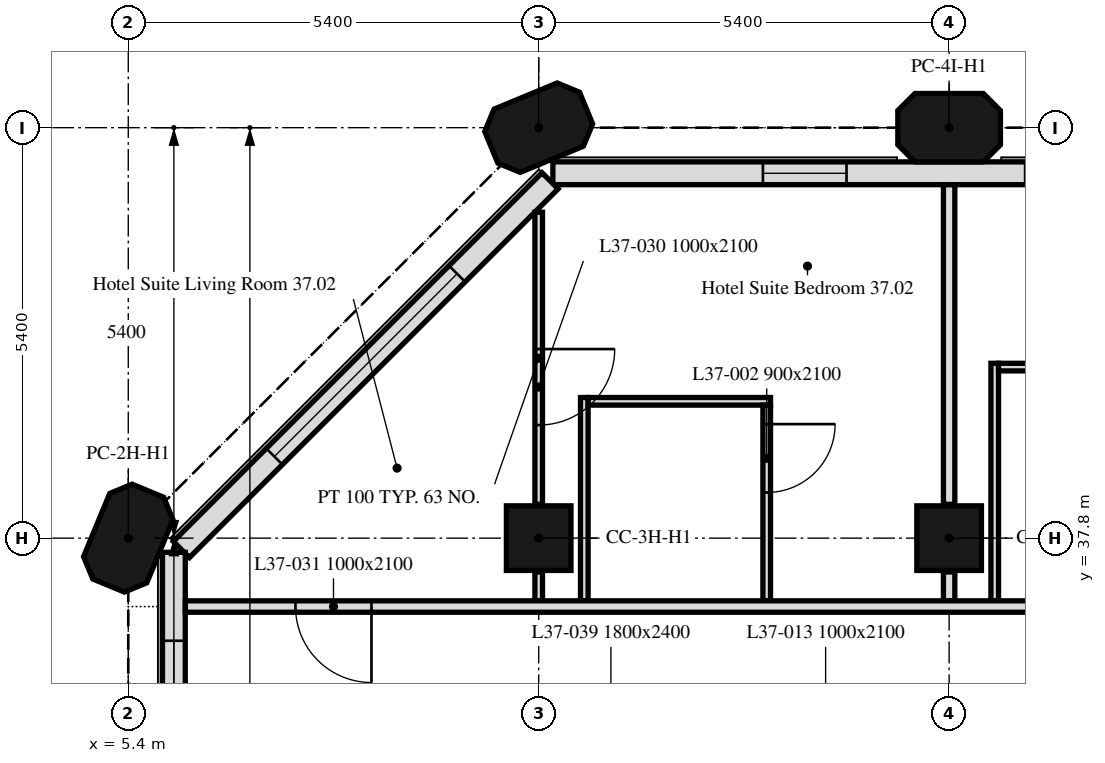
"""IFC4 building model, lengths in metres.
Left out: names, types, materials, properties, quantities, classifications, styles, units other than length and angle.
Written with IfcOpenShell. Run it as: python <this file> out.ifc"""

import sys

from ifc_helpers import new_model, si_unit, direction, frame, frame_2d, origin, origin_2d, place, context, subcontext, project, spatial, polyline, rectangle, outline, extrude, element, fill, save


model = new_model("IFC4")
c1 = context("Model", 3, precision=1e-05, world=origin(), true_north=direction((0.0, 1.0)))
c2 = subcontext(c1, "Body", "Model", "MODEL_VIEW")
j1 = project(units=[si_unit("LENGTHUNIT", "METRE"), si_unit("PLANEANGLEUNIT", "RADIAN")], contexts=[c1])
p1 = place(None, origin())
s1 = spatial("IfcSite", under=j1, at=p1, CompositionType="ELEMENT")
p2 = place(p1, origin())
s2 = spatial("IfcBuilding", under=s1, at=p2, CompositionType="ELEMENT")
p3 = place(p2, frame((0.0, 0.0, 159.4)))
s3 = spatial("IfcBuildingStorey", under=s2, at=p3, CompositionType="ELEMENT", Elevation=159.4)
p4 = place(p3, frame((5.4, 37.8, 0.0), z_axis=(0.0, 0.0, 1.0), x_axis=(0.382683432365, 0.923879532511, 0.0)))
e1 = element("IfcColumn", 1, at=p4, inside=s3, PredefinedType="COLUMN", context=c2, shape_type="SweptSolid", body=[
    extrude(outline(polyline([(-0.45, -0.45), (0.45, -0.45), (0.675, -0.225), (0.675, 0.225), (0.45, 0.45), (-0.45, 0.45), (-0.675, 0.225), (-0.675, -0.225), (-0.45, -0.45)])), origin(), (0.0, 0.0, 1.0), 3.0),
])
for number, where, z_axis, x_axis in (
    (2, (10.8, 37.8, 0.0), (0.0, 0.0, 1.0), (1.0, 0.0, 0.0)),
    (3, (16.2, 37.8, 0.0), (0.0, 0.0, 1.0), (1.0, 0.0, 0.0)),
):
    element("IfcColumn", number, at=place(p3, frame(where, z_axis=z_axis, x_axis=x_axis)), inside=s3, PredefinedType="COLUMN", context=c2, shape_type="SweptSolid", body=[
        extrude(rectangle(XDim=0.85, YDim=0.85, at=origin_2d()), origin(), (0.0, 0.0, 1.0), 3.0),
    ])
for number, where, z_axis, x_axis in (
    (4, (10.8, 43.2, 0.0), (0.0, 0.0, 1.0), (0.924, 0.383, 0.0)),
    (5, (16.2, 43.2, 0.0), (0.0, 0.0, 1.0), (1.0, 0.0, 0.0)),
):
    element("IfcColumn", number, at=place(p3, frame(where, z_axis=z_axis, x_axis=x_axis)), inside=s3, PredefinedType="COLUMN", context=c2, shape_type="SweptSolid", body=[
        extrude(outline(polyline([(-0.45, -0.45), (0.45, -0.45), (0.675, -0.225), (0.675, 0.225), (0.45, 0.45), (-0.45, 0.45), (-0.675, 0.225), (-0.675, -0.225), (-0.45, -0.45)])), origin(), (0.0, 0.0, 1.0), 3.0),
    ])
p5 = place(p3, frame((43.014, 42.6, 0.0), z_axis=(0.0, 0.0, 1.0), x_axis=(-1.0, 0.0, 0.0)))
e6 = element("IfcWall", 6, at=p5, inside=s3, PredefinedType="SOLIDWALL", context=c2, shape_type="SweptSolid", body=[
    extrude(rectangle(XDim=32.027, YDim=0.3, at=frame_2d((16.014, 0.0))), origin(), (0.0, 0.0, 1.0), 3.0),
])
p6 = place(p5, frame((0.814, 0.0, 0.9)))
e7 = element("IfcOpeningElement", 7, at=p6, cuts=e6, PredefinedType="OPENING", context=c2, shape_type="SweptSolid", body=[
    extrude(rectangle(XDim=3.4, YDim=1.7, at=frame_2d((1.7, 0.85))), frame((0.0, 0.16, 0.0), z_axis=(0.0, -1.0, 0.0), x_axis=(1.0, 0.0, 0.0)), (0.0, 0.0, 1.0), 0.32),
])
p7 = place(p5, frame((6.564, 0.0, 0.9)))
e8 = element("IfcOpeningElement", 8, at=p7, cuts=e6, PredefinedType="OPENING", context=c2, shape_type="SweptSolid", body=[
    extrude(rectangle(XDim=1.1, YDim=1.7, at=frame_2d((0.55, 0.85))), frame((0.0, 0.16, 0.0), z_axis=(0.0, -1.0, 0.0), x_axis=(1.0, 0.0, 0.0)), (0.0, 0.0, 1.0), 0.32),
])
p8 = place(p5, frame((11.614, 0.0, 0.9)))
e9 = element("IfcOpeningElement", 9, at=p8, cuts=e6, PredefinedType="OPENING", context=c2, shape_type="SweptSolid", body=[
    extrude(rectangle(XDim=3.4, YDim=1.7, at=frame_2d((1.7, 0.85))), frame((0.0, 0.16, 0.0), z_axis=(0.0, -1.0, 0.0), x_axis=(1.0, 0.0, 0.0)), (0.0, 0.0, 1.0), 0.32),
])
p9 = place(p5, frame((17.364, 0.0, 0.9)))
e10 = element("IfcOpeningElement", 10, at=p9, cuts=e6, PredefinedType="OPENING", context=c2, shape_type="SweptSolid", body=[
    extrude(rectangle(XDim=1.1, YDim=1.7, at=frame_2d((0.55, 0.85))), frame((0.0, 0.16, 0.0), z_axis=(0.0, -1.0, 0.0), x_axis=(1.0, 0.0, 0.0)), (0.0, 0.0, 1.0), 0.32),
])
p10 = place(p5, frame((22.414, 0.0, 0.9)))
e11 = element("IfcOpeningElement", 11, at=p10, cuts=e6, PredefinedType="OPENING", context=c2, shape_type="SweptSolid", body=[
    extrude(rectangle(XDim=3.4, YDim=1.7, at=frame_2d((1.7, 0.85))), frame((0.0, 0.16, 0.0), z_axis=(0.0, -1.0, 0.0), x_axis=(1.0, 0.0, 0.0)), (0.0, 0.0, 1.0), 0.32),
])
p11 = place(p5, frame((28.164, 0.0, 0.9)))
e12 = element("IfcOpeningElement", 12, at=p11, cuts=e6, PredefinedType="OPENING", context=c2, shape_type="SweptSolid", body=[
    extrude(rectangle(XDim=1.1, YDim=1.7, at=frame_2d((0.55, 0.85))), frame((0.0, 0.16, 0.0), z_axis=(0.0, -1.0, 0.0), x_axis=(1.0, 0.0, 0.0)), (0.0, 0.0, 1.0), 0.32),
])
p12 = place(p3, frame((10.949, 42.501, 0.0), z_axis=(0.0, 0.0, 1.0), x_axis=(-0.707106781187, -0.707106781187, 0.0)))
e13 = element("IfcWall", 13, at=p12, inside=s3, PredefinedType="SOLIDWALL", context=c2, shape_type="SweptSolid", body=[
    extrude(rectangle(XDim=6.86, YDim=0.3, at=frame_2d((3.43, 0.0))), origin(), (0.0, 0.0, 1.0), 3.0),
])
p13 = place(p12, frame((1.73, 0.0, 0.9)))
e14 = element("IfcOpeningElement", 14, at=p13, cuts=e13, PredefinedType="OPENING", context=c2, shape_type="SweptSolid", body=[
    extrude(rectangle(XDim=3.4, YDim=1.7, at=frame_2d((1.7, 0.85))), frame((0.0, 0.16, 0.0), z_axis=(0.0, -1.0, 0.0), x_axis=(1.0, 0.0, 0.0)), (0.0, 0.0, 1.0), 0.32),
])
p14 = place(p3, frame((6.0, 37.614, 0.0), z_axis=(0.0, 0.0, 1.0), x_axis=(0.0, -1.0, 0.0)))
e15 = element("IfcWall", 15, at=p14, inside=s3, PredefinedType="SOLIDWALL", context=c2, shape_type="SweptSolid", body=[
    extrude(rectangle(XDim=5.214, YDim=0.3, at=frame_2d((2.607, 0.0))), origin(), (0.0, 0.0, 1.0), 3.0),
])
p15 = place(p14, frame((1.164, 0.0, 0.9)))
e16 = element("IfcOpeningElement", 16, at=p15, cuts=e15, PredefinedType="OPENING", context=c2, shape_type="SweptSolid", body=[
    extrude(rectangle(XDim=1.1, YDim=1.7, at=frame_2d((0.55, 0.85))), frame((0.0, 0.16, 0.0), z_axis=(0.0, -1.0, 0.0), x_axis=(1.0, 0.0, 0.0)), (0.0, 0.0, 1.0), 0.32),
])
p16 = place(p14, frame((2.764, 0.0, 0.9)))
e17 = element("IfcOpeningElement", 17, at=p16, cuts=e15, PredefinedType="OPENING", context=c2, shape_type="SweptSolid", body=[
    extrude(rectangle(XDim=1.1, YDim=1.7, at=frame_2d((0.55, 0.85))), frame((0.0, 0.16, 0.0), z_axis=(0.0, -1.0, 0.0), x_axis=(1.0, 0.0, 0.0)), (0.0, 0.0, 1.0), 0.32),
])
p17 = place(p3, frame((10.8, 42.088, 0.0), z_axis=(0.0, 0.0, 1.0), x_axis=(0.0, -1.0, 0.0)))
e18 = element("IfcWall", 18, at=p17, inside=s3, PredefinedType="PARTITIONING", context=c2, shape_type="SweptSolid", body=[
    extrude(rectangle(XDim=3.843, YDim=0.1, at=frame_2d((1.921, 0.0))), origin(), (0.0, 0.0, 1.0), 3.0),
])
p18 = place(p17, frame((1.8, 0.0, 0.0)))
e19 = element("IfcOpeningElement", 19, at=p18, cuts=e18, PredefinedType="OPENING", context=c2, shape_type="SweptSolid", body=[
    extrude(rectangle(XDim=1.0, YDim=2.1, at=frame_2d((0.5, 1.05))), frame((0.0, 0.05, 0.0), z_axis=(0.0, -1.0, 0.0), x_axis=(1.0, 0.0, 0.0)), (0.0, 0.0, 1.0), 0.1),
])
p19 = place(p3, frame((10.8, 37.355, 0.0), z_axis=(0.0, 0.0, 1.0), x_axis=(0.0, -1.0, 0.0)))
e20 = element("IfcWall", 20, at=p19, inside=s3, PredefinedType="PARTITIONING", context=c2, shape_type="SweptSolid", body=[
    extrude(rectangle(XDim=0.38, YDim=0.1, at=frame_2d((0.19, 0.0))), origin(), (0.0, 0.0, 1.0), 3.0),
])
p20 = place(p3, frame((11.4, 36.975, 0.0), z_axis=(0.0, 0.0, 1.0), x_axis=(0.0, 1.0, 0.0)))
e21 = element("IfcWall", 21, at=p20, inside=s3, PredefinedType="PARTITIONING", context=c2, shape_type="SweptSolid", body=[
    extrude(rectangle(XDim=2.675, YDim=0.1, at=frame_2d((1.337, 0.0))), origin(), (0.0, 0.0, 1.0), 3.0),
])
p21 = place(p3, frame((11.45, 39.6, 0.0), z_axis=(0.0, 0.0, 1.0), x_axis=(1.0, 0.0, 0.0)))
e22 = element("IfcWall", 22, at=p21, inside=s3, PredefinedType="PARTITIONING", context=c2, shape_type="SweptSolid", body=[
    extrude(rectangle(XDim=2.4, YDim=0.1, at=frame_2d((1.2, 0.0))), origin(), (0.0, 0.0, 1.0), 3.0),
])
p22 = place(p3, frame((13.8, 39.55, 0.0), z_axis=(0.0, 0.0, 1.0), x_axis=(0.0, -1.0, 0.0)))
e23 = element("IfcWall", 23, at=p22, inside=s3, PredefinedType="PARTITIONING", context=c2, shape_type="SweptSolid", body=[
    extrude(rectangle(XDim=2.575, YDim=0.1, at=frame_2d((1.288, 0.0))), origin(), (0.0, 0.0, 1.0), 3.0),
])
p23 = place(p22, frame((0.25, 0.0, 0.0)))
e24 = element("IfcOpeningElement", 24, at=p23, cuts=e23, PredefinedType="OPENING", context=c2, shape_type="SweptSolid", body=[
    extrude(rectangle(XDim=0.9, YDim=2.1, at=frame_2d((0.45, 1.05))), frame((0.0, 0.05, 0.0), z_axis=(0.0, -1.0, 0.0), x_axis=(1.0, 0.0, 0.0)), (0.0, 0.0, 1.0), 0.1),
])
p24 = place(p3, frame((16.2, 36.975, 0.0), z_axis=(0.0, 0.0, 1.0), x_axis=(0.0, 1.0, 0.0)))
e25 = element("IfcWall", 25, at=p24, inside=s3, PredefinedType="PARTITIONING", context=c2, shape_type="SweptSolid", body=[
    extrude(rectangle(XDim=0.38, YDim=0.15, at=frame_2d((0.19, 0.0))), origin(), (0.0, 0.0, 1.0), 3.0),
])
p25 = place(p3, frame((16.2, 38.245, 0.0), z_axis=(0.0, 0.0, 1.0), x_axis=(0.0, 1.0, 0.0)))
e26 = element("IfcWall", 26, at=p25, inside=s3, PredefinedType="PARTITIONING", context=c2, shape_type="SweptSolid", body=[
    extrude(rectangle(XDim=4.204, YDim=0.15, at=frame_2d((2.102, 0.0))), origin(), (0.0, 0.0, 1.0), 3.0),
])
p26 = place(p3, frame((16.8, 36.975, 0.0), z_axis=(0.0, 0.0, 1.0), x_axis=(0.0, 1.0, 0.0)))
e27 = element("IfcWall", 27, at=p26, inside=s3, PredefinedType="PARTITIONING", context=c2, shape_type="SweptSolid", body=[
    extrude(rectangle(XDim=3.125, YDim=0.1, at=frame_2d((1.562, 0.0))), origin(), (0.0, 0.0, 1.0), 3.0),
])
p27 = place(p3, frame((16.85, 40.05, 0.0), z_axis=(0.0, 0.0, 1.0), x_axis=(1.0, 0.0, 0.0)))
e28 = element("IfcWall", 28, at=p27, inside=s3, PredefinedType="PARTITIONING", context=c2, shape_type="SweptSolid", body=[
    extrude(rectangle(XDim=2.1, YDim=0.1, at=frame_2d((1.05, 0.0))), origin(), (0.0, 0.0, 1.0), 3.0),
])
p28 = place(p3, frame((47.849, 36.9, 0.0), z_axis=(0.0, 0.0, 1.0), x_axis=(-1.0, 0.0, 0.0)))
e29 = element("IfcWall", 29, at=p28, inside=s3, PredefinedType="PARTITIONING", context=c2, shape_type="SweptSolid", body=[
    extrude(rectangle(XDim=41.698, YDim=0.15, at=frame_2d((20.849, 0.0))), origin(), (0.0, 0.0, 1.0), 3.0),
])
p29 = place(p28, frame((39.249, 0.0, 0.0)))
e30 = element("IfcOpeningElement", 30, at=p29, cuts=e29, PredefinedType="OPENING", context=c2, shape_type="SweptSolid", body=[
    extrude(rectangle(XDim=1.0, YDim=2.1, at=frame_2d((0.5, 1.05))), frame((0.0, 0.075, 0.0), z_axis=(0.0, -1.0, 0.0), x_axis=(1.0, 0.0, 0.0)), (0.0, 0.0, 1.0), 0.15),
])
p30 = place(p28, frame((27.649, 0.0, 0.0)))
e31 = element("IfcOpeningElement", 31, at=p30, cuts=e29, PredefinedType="OPENING", context=c2, shape_type="SweptSolid", body=[
    extrude(rectangle(XDim=1.0, YDim=2.1, at=frame_2d((0.5, 1.05))), frame((0.0, 0.075, 0.0), z_axis=(0.0, -1.0, 0.0), x_axis=(1.0, 0.0, 0.0)), (0.0, 0.0, 1.0), 0.15),
])
p31 = place(p28, frame((22.249, 0.0, 0.0)))
e32 = element("IfcOpeningElement", 32, at=p31, cuts=e29, PredefinedType="OPENING", context=c2, shape_type="SweptSolid", body=[
    extrude(rectangle(XDim=1.0, YDim=2.1, at=frame_2d((0.5, 1.05))), frame((0.0, 0.075, 0.0), z_axis=(0.0, -1.0, 0.0), x_axis=(1.0, 0.0, 0.0)), (0.0, 0.0, 1.0), 0.15),
])
p32 = place(p28, frame((16.849, 0.0, 0.0)))
e33 = element("IfcOpeningElement", 33, at=p32, cuts=e29, PredefinedType="OPENING", context=c2, shape_type="SweptSolid", body=[
    extrude(rectangle(XDim=1.0, YDim=2.1, at=frame_2d((0.5, 1.05))), frame((0.0, 0.075, 0.0), z_axis=(0.0, -1.0, 0.0), x_axis=(1.0, 0.0, 0.0)), (0.0, 0.0, 1.0), 0.15),
])
p33 = place(p28, frame((11.449, 0.0, 0.0)))
e34 = element("IfcOpeningElement", 34, at=p33, cuts=e29, PredefinedType="OPENING", context=c2, shape_type="SweptSolid", body=[
    extrude(rectangle(XDim=1.0, YDim=2.1, at=frame_2d((0.5, 1.05))), frame((0.0, 0.075, 0.0), z_axis=(0.0, -1.0, 0.0), x_axis=(1.0, 0.0, 0.0)), (0.0, 0.0, 1.0), 0.15),
])
p34 = place(p28, frame((2.744, 0.0, 0.0)))
e35 = element("IfcOpeningElement", 35, at=p34, cuts=e29, PredefinedType="OPENING", context=c2, shape_type="SweptSolid", body=[
    extrude(rectangle(XDim=1.0, YDim=2.1, at=frame_2d((0.5, 1.05))), frame((0.0, 0.075, 0.0), z_axis=(0.0, -1.0, 0.0), x_axis=(1.0, 0.0, 0.0)), (0.0, 0.0, 1.0), 0.15),
])
p35 = place(p11, origin())
e36 = element("IfcWindow", 36, at=p35, inside=s3, PartitioningType="SINGLE_PANEL", PredefinedType="WINDOW", context=c2, shape_type="SweptSolid", body=[
    extrude(rectangle(XDim=1.1, YDim=1.7, at=frame_2d((0.55, 0.85))), frame((0.0, 0.03, 0.0), z_axis=(0.0, -1.0, 0.0), x_axis=(1.0, 0.0, 0.0)), (0.0, 0.0, 1.0), 0.06),
])
fill(e12, e36)
p36 = place(p13, origin())
e37 = element("IfcWindow", 37, at=p36, inside=s3, PartitioningType="SINGLE_PANEL", PredefinedType="WINDOW", context=c2, shape_type="SweptSolid", body=[
    extrude(rectangle(XDim=3.4, YDim=1.7, at=frame_2d((1.7, 0.85))), frame((0.0, 0.03, 0.0), z_axis=(0.0, -1.0, 0.0), x_axis=(1.0, 0.0, 0.0)), (0.0, 0.0, 1.0), 0.06),
])
fill(e14, e37)
p37 = place(p15, origin())
e38 = element("IfcWindow", 38, at=p37, inside=s3, PartitioningType="SINGLE_PANEL", PredefinedType="WINDOW", context=c2, shape_type="SweptSolid", body=[
    extrude(rectangle(XDim=1.1, YDim=1.7, at=frame_2d((0.55, 0.85))), frame((0.0, 0.03, 0.0), z_axis=(0.0, -1.0, 0.0), x_axis=(1.0, 0.0, 0.0)), (0.0, 0.0, 1.0), 0.06),
])
fill(e16, e38)
p38 = place(p23, origin())
e39 = element("IfcDoor", 39, at=p38, inside=s3, OperationType="SINGLE_SWING_LEFT", PredefinedType="DOOR", context=c2, shape_type="SweptSolid", body=[
    extrude(rectangle(XDim=0.9, YDim=2.1, at=frame_2d((0.45, 1.05))), frame((0.0, 0.025, 0.0), z_axis=(0.0, -1.0, 0.0), x_axis=(1.0, 0.0, 0.0)), (0.0, 0.0, 1.0), 0.05),
])
fill(e24, e39)
p39 = place(p18, origin())
e40 = element("IfcDoor", 40, at=p39, inside=s3, OperationType="SINGLE_SWING_LEFT", PredefinedType="DOOR", context=c2, shape_type="SweptSolid", body=[
    extrude(rectangle(XDim=1.0, YDim=2.1, at=frame_2d((0.5, 1.05))), frame((0.0, 0.025, 0.0), z_axis=(0.0, -1.0, 0.0), x_axis=(1.0, 0.0, 0.0)), (0.0, 0.0, 1.0), 0.05),
])
fill(e19, e40)
p40 = place(p29, origin())
e41 = element("IfcDoor", 41, at=p40, inside=s3, OperationType="SINGLE_SWING_RIGHT", PredefinedType="DOOR", context=c2, shape_type="SweptSolid", body=[
    extrude(rectangle(XDim=1.0, YDim=2.1, at=frame_2d((0.5, 1.05))), frame((0.0, 0.025, 0.0), z_axis=(0.0, -1.0, 0.0), x_axis=(1.0, 0.0, 0.0)), (0.0, 0.0, 1.0), 0.05),
])
fill(e30, e41)
save(model, sys.argv[1])
